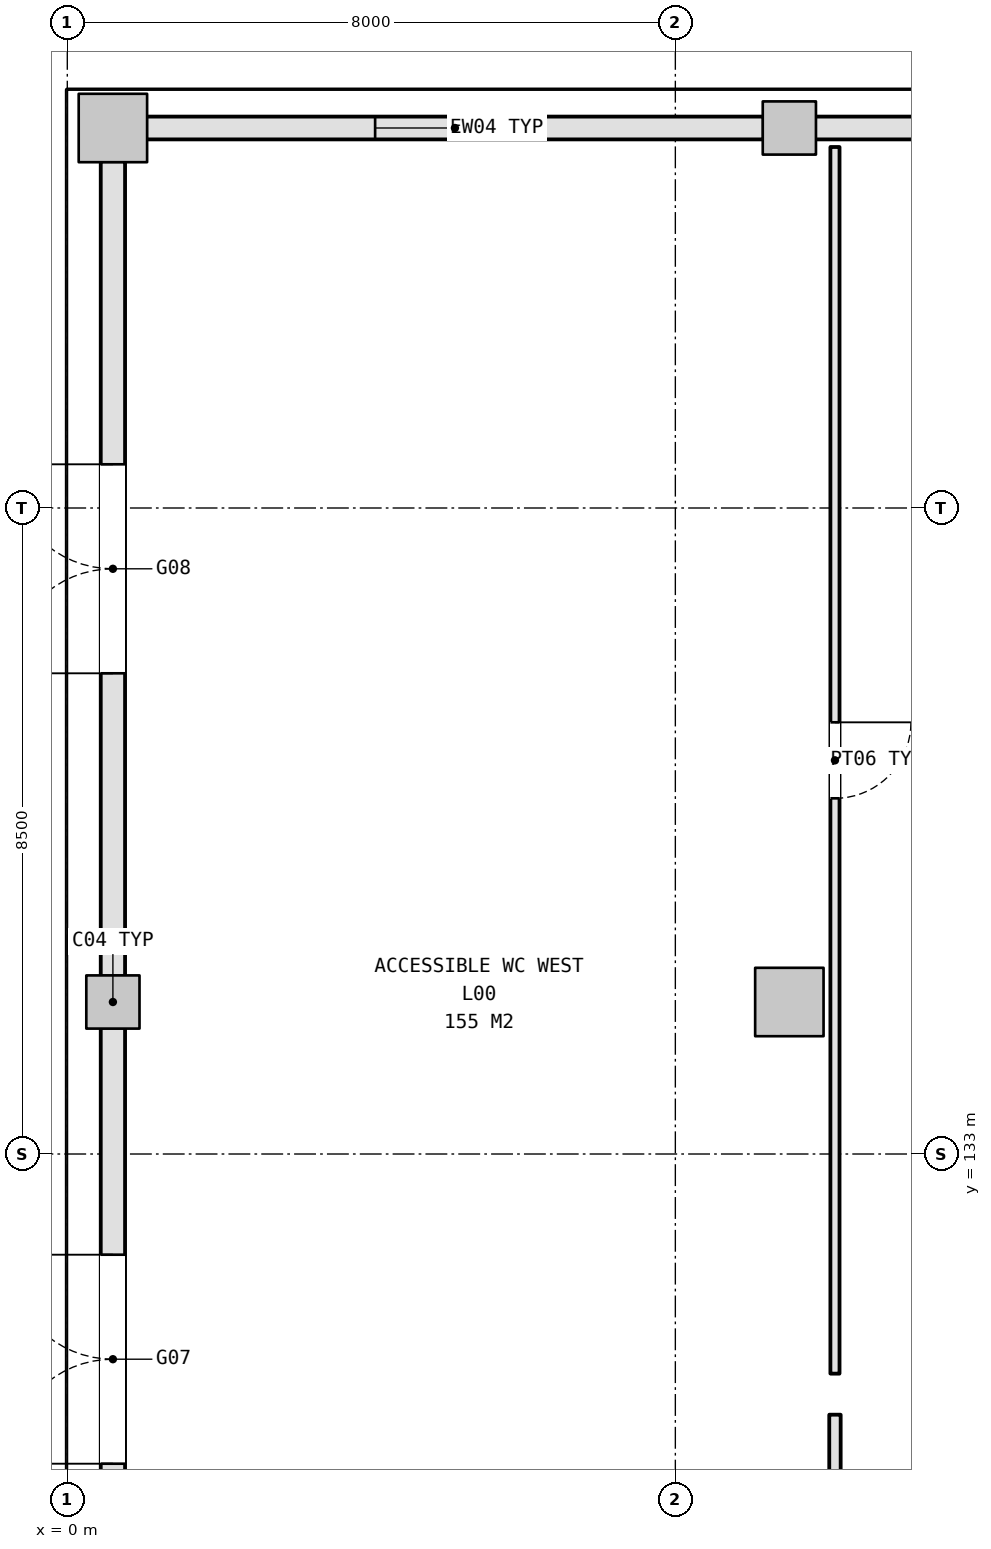
"""IFC4 building model, lengths in metres.
Left out: names, types, materials, properties, quantities, classifications, styles, units other than length and angle.
Written with IfcOpenShell. Run it as: python <this file> out.ifc"""

import sys

from ifc_helpers import new_model, si_unit, direction, frame, frame_2d, origin, origin_2d, place, context, subcontext, project, spatial, rectangle, extrude, element, fill, save


model = new_model("IFC4")
c1 = context("Model", 3, precision=1e-05, world=origin(), true_north=direction((0.0, 1.0)))
c2 = subcontext(c1, "Body", "Model", "MODEL_VIEW")
j1 = project(units=[si_unit("LENGTHUNIT", "METRE"), si_unit("PLANEANGLEUNIT", "RADIAN")], contexts=[c1])
p1 = place(None, origin())
s1 = spatial("IfcSite", under=j1, at=p1, CompositionType="ELEMENT")
p2 = place(p1, origin())
s2 = spatial("IfcBuilding", under=s1, at=p2, CompositionType="ELEMENT")
p3 = place(p2, origin())
s3 = spatial("IfcBuildingStorey", under=s2, at=p3, CompositionType="ELEMENT", Elevation=0.0)
p4 = place(p3, frame((0.6, 135.0, 0.0), z_axis=(0.0, 0.0, 1.0), x_axis=(1.0, 0.0, 0.0)))
e1 = element("IfcColumn", 1, at=p4, inside=s3, PredefinedType="COLUMN", context=c2, shape_type="SweptSolid", body=[
    extrude(rectangle(XDim=0.7, YDim=0.7, at=origin_2d()), origin(), (0.0, 0.0, 1.0), 5.4),
])
for number, where, z_axis, x_axis in (
    (2, (0.6, 146.5, 0.0), (0.0, 0.0, 1.0), (1.0, 0.0, 0.0)),
    (3, (9.5, 135.0, 0.0), (0.0, 0.0, 1.0), (1.0, 0.0, 0.0)),
):
    element("IfcColumn", number, at=place(p3, frame(where, z_axis=z_axis, x_axis=x_axis)), inside=s3, PredefinedType="COLUMN", context=c2, shape_type="SweptSolid", body=[
        extrude(rectangle(XDim=0.9, YDim=0.9, at=origin_2d()), origin(), (0.0, 0.0, 1.0), 5.4),
    ])
p5 = place(p3, frame((9.5, 146.5, 0.0), z_axis=(0.0, 0.0, 1.0), x_axis=(1.0, 0.0, 0.0)))
e4 = element("IfcColumn", 4, at=p5, inside=s3, PredefinedType="COLUMN", context=c2, shape_type="SweptSolid", body=[
    extrude(rectangle(XDim=0.7, YDim=0.7, at=origin_2d()), origin(), (0.0, 0.0, 1.0), 5.4),
])
p6 = place(p3, frame((0.6, 125.938, 0.0), z_axis=(0.0, 0.0, 1.0), x_axis=(0.0, 1.0, 0.0)))
e5 = element("IfcWall", 5, at=p6, inside=s3, PredefinedType="SOLIDWALL", context=c2, shape_type="SweptSolid", body=[
    extrude(rectangle(XDim=8.724, YDim=0.32, at=frame_2d((4.362, 0.0))), origin(), (0.0, 0.0, 1.0), 4.475),
])
p7 = place(p6, frame((2.987, 0.0, 0.0)))
e6 = element("IfcOpeningElement", 6, at=p7, cuts=e5, PredefinedType="OPENING", context=c2, shape_type="SweptSolid", body=[
    extrude(rectangle(XDim=2.75, YDim=2.4, at=frame_2d((1.375, 1.2))), frame((0.0, 0.17, 0.0), z_axis=(0.0, -1.0, 0.0), x_axis=(1.0, 0.0, 0.0)), (0.0, 0.0, 1.0), 0.34),
])
p8 = place(p3, frame((0.6, 135.338, 0.0), z_axis=(0.0, 0.0, 1.0), x_axis=(0.0, 1.0, 0.0)))
e7 = element("IfcWall", 7, at=p8, inside=s3, PredefinedType="SOLIDWALL", context=c2, shape_type="SweptSolid", body=[
    extrude(rectangle(XDim=10.724, YDim=0.32, at=frame_2d((5.362, 0.0))), origin(), (0.0, 0.0, 1.0), 4.475),
])
p9 = place(p8, frame((3.987, 0.0, 0.0)))
e8 = element("IfcOpeningElement", 8, at=p9, cuts=e7, PredefinedType="OPENING", context=c2, shape_type="SweptSolid", body=[
    extrude(rectangle(XDim=2.75, YDim=2.4, at=frame_2d((1.375, 1.2))), frame((0.0, 0.17, 0.0), z_axis=(0.0, -1.0, 0.0), x_axis=(1.0, 0.0, 0.0)), (0.0, 0.0, 1.0), 0.34),
])
p10 = place(p3, frame((1.038, 146.5, 0.0), z_axis=(0.0, 0.0, 1.0), x_axis=(1.0, 0.0, 0.0)))
e9 = element("IfcWall", 9, at=p10, inside=s3, PredefinedType="SOLIDWALL", context=c2, shape_type="SweptSolid", body=[
    extrude(rectangle(XDim=8.124, YDim=0.3, at=frame_2d((4.062, 0.0))), origin(), (0.0, 0.0, 1.0), 4.475),
])
p11 = place(p10, frame((3.012, 0.0, 1.05)))
e10 = element("IfcOpeningElement", 10, at=p11, cuts=e9, PredefinedType="OPENING", context=c2, shape_type="SweptSolid", body=[
    extrude(rectangle(XDim=2.1, YDim=2.1, at=frame_2d((1.05, 1.05))), frame((0.0, 0.16, 0.0), z_axis=(0.0, -1.0, 0.0), x_axis=(1.0, 0.0, 0.0)), (0.0, 0.0, 1.0), 0.32),
])
p12 = place(p3, frame((9.838, 146.5, 0.0), z_axis=(0.0, 0.0, 1.0), x_axis=(1.0, 0.0, 0.0)))
e11 = element("IfcWall", 11, at=p12, inside=s3, PredefinedType="SOLIDWALL", context=c2, shape_type="SweptSolid", body=[
    extrude(rectangle(XDim=8.124, YDim=0.3, at=frame_2d((4.062, 0.0))), origin(), (0.0, 0.0, 1.0), 4.475),
])
p13 = place(p12, frame((3.012, 0.0, 1.05)))
e12 = element("IfcOpeningElement", 12, at=p13, cuts=e11, PredefinedType="OPENING", context=c2, shape_type="SweptSolid", body=[
    extrude(rectangle(XDim=2.1, YDim=2.1, at=frame_2d((1.05, 1.05))), frame((0.0, 0.16, 0.0), z_axis=(0.0, -1.0, 0.0), x_axis=(1.0, 0.0, 0.0)), (0.0, 0.0, 1.0), 0.32),
])
p14 = place(p3, frame((10.1, 129.57, 0.0), z_axis=(0.0, 0.0, 1.0), x_axis=(0.0, -1.0, 0.0)))
e13 = element("IfcWall", 13, at=p14, inside=s3, PredefinedType="PARTITIONING", context=c2, shape_type="SweptSolid", body=[
    extrude(rectangle(XDim=7.338, YDim=0.15, at=frame_2d((3.669, 0.0))), origin(), (0.0, 0.0, 1.0), 4.668),
])
p15 = place(p14, frame((2.294, 0.0, 0.0)))
e14 = element("IfcOpeningElement", 14, at=p15, cuts=e13, PredefinedType="OPENING", context=c2, shape_type="SweptSolid", body=[
    extrude(rectangle(XDim=1.15, YDim=2.2, at=frame_2d((0.575, 1.1))), frame((0.0, 0.085, 0.0), z_axis=(0.0, -1.0, 0.0), x_axis=(1.0, 0.0, 0.0)), (0.0, 0.0, 1.0), 0.17),
])
p16 = place(p3, frame((10.1, 146.25, 0.0), z_axis=(0.0, 0.0, 1.0), x_axis=(0.0, -1.0, 0.0)))
e15 = element("IfcWall", 15, at=p16, inside=s3, PredefinedType="PARTITIONING", context=c2, shape_type="SweptSolid", body=[
    extrude(rectangle(XDim=16.14, YDim=0.12, at=frame_2d((8.07, 0.0))), origin(), (0.0, 0.0, 1.0), 4.668),
])
p17 = place(p16, frame((7.57, 0.0, 0.0)))
e16 = element("IfcOpeningElement", 16, at=p17, cuts=e15, PredefinedType="OPENING", context=c2, shape_type="SweptSolid", body=[
    extrude(rectangle(XDim=1.0, YDim=2.15, at=frame_2d((0.5, 1.075))), frame((0.0, 0.07, 0.0), z_axis=(0.0, -1.0, 0.0), x_axis=(1.0, 0.0, 0.0)), (0.0, 0.0, 1.0), 0.14),
])
p18 = place(p7, origin())
e17 = element("IfcDoor", 17, at=p18, inside=s3, OperationType="DOUBLE_DOOR_SINGLE_SWING", PredefinedType="DOOR", context=c2, shape_type="SweptSolid", body=[
    extrude(rectangle(XDim=2.75, YDim=2.4, at=frame_2d((1.375, 1.2))), frame((0.0, 0.025, 0.0), z_axis=(0.0, -1.0, 0.0), x_axis=(1.0, 0.0, 0.0)), (0.0, 0.0, 1.0), 0.05),
])
fill(e6, e17)
p19 = place(p9, origin())
e18 = element("IfcDoor", 18, at=p19, inside=s3, OperationType="DOUBLE_DOOR_SINGLE_SWING", PredefinedType="DOOR", context=c2, shape_type="SweptSolid", body=[
    extrude(rectangle(XDim=2.75, YDim=2.4, at=frame_2d((1.375, 1.2))), frame((0.0, 0.025, 0.0), z_axis=(0.0, -1.0, 0.0), x_axis=(1.0, 0.0, 0.0)), (0.0, 0.0, 1.0), 0.05),
])
fill(e8, e18)
p20 = place(p11, origin())
e19 = element("IfcWindow", 19, at=p20, inside=s3, PartitioningType="SINGLE_PANEL", PredefinedType="WINDOW", context=c2, shape_type="SweptSolid", body=[
    extrude(rectangle(XDim=2.1, YDim=2.1, at=frame_2d((1.05, 1.05))), frame((0.0, 0.03, 0.0), z_axis=(0.0, -1.0, 0.0), x_axis=(1.0, 0.0, 0.0)), (0.0, 0.0, 1.0), 0.06),
])
fill(e10, e19)
p21 = place(p17, origin())
e20 = element("IfcDoor", 20, at=p21, inside=s3, OperationType="SINGLE_SWING_LEFT", PredefinedType="DOOR", context=c2, shape_type="SweptSolid", body=[
    extrude(rectangle(XDim=1.0, YDim=2.15, at=frame_2d((0.5, 1.075))), frame((0.0, 0.025, 0.0), z_axis=(0.0, -1.0, 0.0), x_axis=(1.0, 0.0, 0.0)), (0.0, 0.0, 1.0), 0.05),
])
fill(e16, e20)
save(model, sys.argv[1])
